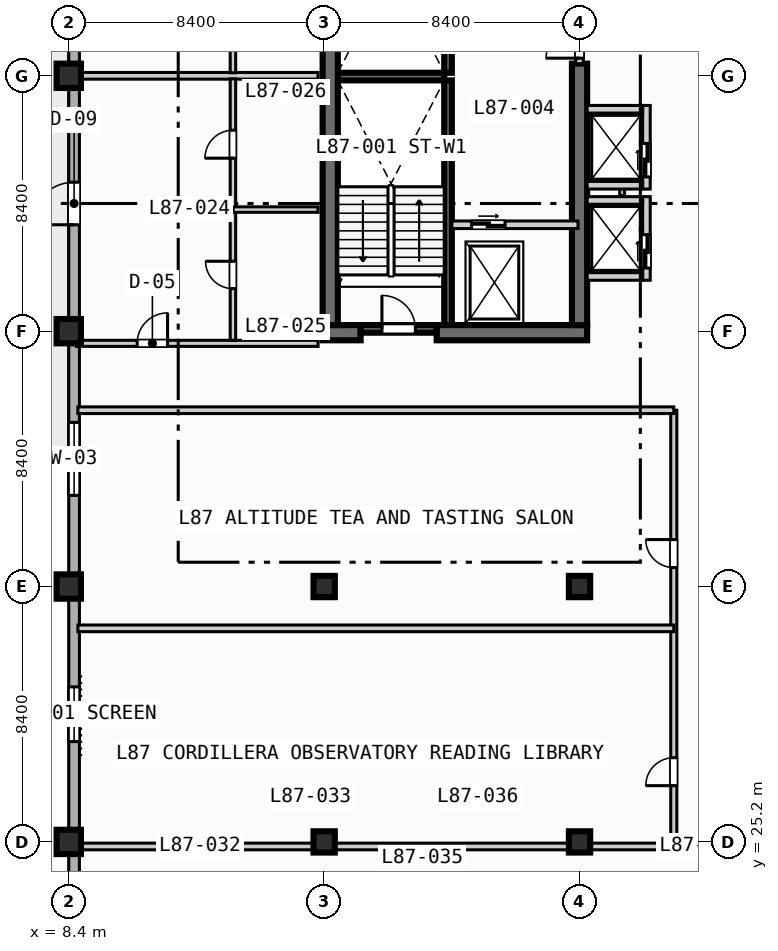
"""IFC4 building model, lengths in metres.
Left out: names, types, materials, properties, quantities, classifications, styles, units other than length and angle.
Written with IfcOpenShell. Run it as: python <this file> out.ifc"""

import sys

from ifc_helpers import new_model, si_unit, direction, frame, frame_2d, origin, origin_2d, place, context, subcontext, project, spatial, rectangle, extrude, element, fill, save


model = new_model("IFC4")
c1 = context("Model", 3, precision=1e-05, world=origin(), true_north=direction((0.0, 1.0)))
c2 = subcontext(c1, "Body", "Model", "MODEL_VIEW")
j1 = project(units=[si_unit("LENGTHUNIT", "METRE"), si_unit("PLANEANGLEUNIT", "RADIAN")], contexts=[c1])
p1 = place(None, origin())
s1 = spatial("IfcSite", under=j1, at=p1, CompositionType="ELEMENT")
p2 = place(p1, origin())
s2 = spatial("IfcBuilding", under=s1, at=p2, CompositionType="ELEMENT")
p3 = place(p2, frame((0.0, 0.0, 351.5)))
s3 = spatial("IfcBuildingStorey", under=s2, at=p3, CompositionType="ELEMENT", Elevation=351.5)
for number, where, z_axis, x_axis in (
    (1, (20.875, 42.2, 0.0), (0.0, 0.0, 1.0), (0.0, 1.0, 0.0)),
    (2, (20.875, 50.5, 0.0), (0.0, 0.0, 1.0), (0.0, 1.0, 0.0)),
):
    element("IfcWall", number, at=place(p3, frame(where, z_axis=z_axis, x_axis=x_axis)), inside=s3, PredefinedType="SOLIDWALL", context=c2, shape_type="SweptSolid", body=[
        extrude(rectangle(XDim=8.05, YDim=0.25, at=frame_2d((4.025, 0.0))), origin(), (0.0, 0.0, 1.0), 3.67),
    ])
p4 = place(p3, frame((17.25, 50.375, 0.0), z_axis=(0.0, 0.0, 1.0), x_axis=(1.0, 0.0, 0.0)))
e3 = element("IfcWall", 3, at=p4, inside=s3, PredefinedType="SOLIDWALL", context=c2, shape_type="SweptSolid", body=[
    extrude(rectangle(XDim=3.5, YDim=0.25, at=frame_2d((1.75, 0.0))), origin(), (0.0, 0.0, 1.0), 3.67),
])
p5 = place(p3, frame((16.75, 41.95, 0.0), z_axis=(0.0, 0.0, 1.0), x_axis=(1.0, 0.0, 0.0)))
e4 = element("IfcWall", 4, at=p5, inside=s3, PredefinedType="SHEAR", context=c2, shape_type="SweptSolid", body=[
    extrude(rectangle(XDim=1.25, YDim=0.5, at=frame_2d((0.625, 0.0))), origin(), (0.0, 0.0, 1.0), 3.67),
])
p6 = place(p3, frame((20.5, 41.95, 0.0), z_axis=(0.0, 0.0, 1.0), x_axis=(1.0, 0.0, 0.0)))
e5 = element("IfcWall", 5, at=p6, inside=s3, PredefinedType="SHEAR", context=c2, shape_type="SweptSolid", body=[
    extrude(rectangle(XDim=4.95, YDim=0.5, at=frame_2d((2.475, 0.0))), origin(), (0.0, 0.0, 1.0), 3.67),
])
p7 = place(p3, frame((17.0, 42.2, 0.0), z_axis=(0.0, 0.0, 1.0), x_axis=(0.0, 1.0, 0.0)))
e6 = element("IfcWall", 6, at=p7, inside=s3, PredefinedType="SHEAR", context=c2, shape_type="SweptSolid", body=[
    extrude(rectangle(XDim=16.35, YDim=0.5, at=frame_2d((8.175, 0.0))), origin(), (0.0, 0.0, 1.0), 3.67),
])
p8 = place(p3, frame((25.2, 42.2, 0.0), z_axis=(0.0, 0.0, 1.0), x_axis=(0.0, 1.0, 0.0)))
e7 = element("IfcWall", 7, at=p8, inside=s3, PredefinedType="SHEAR", context=c2, shape_type="SweptSolid", body=[
    extrude(rectangle(XDim=8.6, YDim=0.5, at=frame_2d((4.3, 0.0))), origin(), (0.0, 0.0, 1.0), 3.67),
])
for number, where, z_axis, x_axis in (
    (8, (8.4, 25.2, 0.0), (0.0, 0.0, 1.0), (1.0, 0.0, 0.0)),
    (9, (8.4, 33.6, 0.0), (0.0, 0.0, 1.0), (1.0, 0.0, 0.0)),
    (10, (8.4, 42.0, 0.0), (0.0, 0.0, 1.0), (1.0, 0.0, 0.0)),
    (11, (8.4, 50.4, 0.0), (0.0, 0.0, 1.0), (1.0, 0.0, 0.0)),
):
    element("IfcColumn", number, at=place(p3, frame(where, z_axis=z_axis, x_axis=x_axis)), inside=s3, PredefinedType="COLUMN", context=c2, shape_type="SweptSolid", body=[
        extrude(rectangle(XDim=0.8, YDim=0.8, at=origin_2d()), origin(), (0.0, 0.0, 1.0), 3.9),
    ])
for number, where, z_axis, x_axis in (
    (12, (16.8, 25.2, 0.0), (0.0, 0.0, 1.0), (1.0, 0.0, 0.0)),
    (13, (16.8, 33.6, 0.0), (0.0, 0.0, 1.0), (1.0, 0.0, 0.0)),
    (14, (25.2, 25.2, 0.0), (0.0, 0.0, 1.0), (1.0, 0.0, 0.0)),
    (15, (25.2, 33.6, 0.0), (0.0, 0.0, 1.0), (1.0, 0.0, 0.0)),
):
    element("IfcColumn", number, at=place(p3, frame(where, z_axis=z_axis, x_axis=x_axis)), inside=s3, PredefinedType="COLUMN", context=c2, shape_type="SweptSolid", body=[
        extrude(rectangle(XDim=0.7, YDim=0.7, at=origin_2d()), origin(), (0.0, 0.0, 1.0), 3.9),
    ])
p9 = place(p3, frame((8.575, 11.575, 0.0), z_axis=(0.0, 0.0, 1.0), x_axis=(0.0, 1.0, 0.0)))
e16 = element("IfcWall", 16, at=p9, inside=s3, PredefinedType="STANDARD", context=c2, shape_type="SweptSolid", body=[
    extrude(rectangle(XDim=60.85, YDim=0.35, at=frame_2d((30.425, 0.0))), origin(), (0.0, 0.0, 1.0), 3.67),
])
p10 = place(p9, frame((33.925, 0.0, 0.0)))
e17 = element("IfcOpeningElement", 17, at=p10, cuts=e16, PredefinedType="OPENING", context=c2, shape_type="SweptSolid", body=[
    extrude(rectangle(XDim=1.4, YDim=2.2, at=frame_2d((0.7, 1.1))), frame((0.0, 0.185, 0.0), z_axis=(0.0, -1.0, 0.0), x_axis=(1.0, 0.0, 0.0)), (0.0, 0.0, 1.0), 0.37),
])
p11 = place(p9, frame((16.925, 0.0, 0.85)))
e18 = element("IfcOpeningElement", 18, at=p11, cuts=e16, PredefinedType="OPENING", context=c2, shape_type="SweptSolid", body=[
    extrude(rectangle(XDim=1.8, YDim=1.8, at=frame_2d((0.9, 0.9))), frame((0.0, 0.185, 0.0), z_axis=(0.0, -1.0, 0.0), x_axis=(1.0, 0.0, 0.0)), (0.0, 0.0, 1.0), 0.37),
])
p12 = place(p9, frame((25.025, 0.0, 0.85)))
e19 = element("IfcOpeningElement", 19, at=p12, cuts=e16, PredefinedType="OPENING", context=c2, shape_type="SweptSolid", body=[
    extrude(rectangle(XDim=2.4, YDim=1.95, at=frame_2d((1.2, 0.975))), frame((0.0, 0.185, 0.0), z_axis=(0.0, -1.0, 0.0), x_axis=(1.0, 0.0, 0.0)), (0.0, 0.0, 1.0), 0.37),
])
p13 = place(p9, frame((41.825, 0.0, 0.85)))
e20 = element("IfcOpeningElement", 20, at=p13, cuts=e16, PredefinedType="OPENING", context=c2, shape_type="SweptSolid", body=[
    extrude(rectangle(XDim=2.4, YDim=1.95, at=frame_2d((1.2, 0.975))), frame((0.0, 0.185, 0.0), z_axis=(0.0, -1.0, 0.0), x_axis=(1.0, 0.0, 0.0)), (0.0, 0.0, 1.0), 0.37),
])
p14 = place(p3, frame((18.0, 42.075, 0.0), z_axis=(0.0, 0.0, 1.0), x_axis=(1.0, 0.0, 0.0)))
e21 = element("IfcWall", 21, at=p14, inside=s3, PredefinedType="SOLIDWALL", context=c2, shape_type="SweptSolid", body=[
    extrude(rectangle(XDim=2.5, YDim=0.25, at=frame_2d((1.25, 0.0))), origin(), (0.0, 0.0, 1.0), 3.67),
])
p15 = place(p14, frame((0.7, 0.0, 0.0)))
e22 = element("IfcOpeningElement", 22, at=p15, cuts=e21, PredefinedType="OPENING", context=c2, shape_type="SweptSolid", body=[
    extrude(rectangle(XDim=1.1, YDim=2.15, at=frame_2d((0.55, 1.075))), frame((0.0, 0.135, 0.0), z_axis=(0.0, -1.0, 0.0), x_axis=(1.0, 0.0, 0.0)), (0.0, 0.0, 1.0), 0.27),
])
p16 = place(p3, frame((21.0, 45.5, 0.0), z_axis=(0.0, 0.0, 1.0), x_axis=(1.0, 0.0, 0.0)))
e23 = element("IfcWall", 23, at=p16, inside=s3, PredefinedType="SOLIDWALL", context=c2, shape_type="SweptSolid", body=[
    extrude(rectangle(XDim=4.15, YDim=0.25, at=frame_2d((2.075, 0.0))), origin(), (0.0, 0.0, 1.0), 3.67),
])
p17 = place(p16, frame((0.65, 0.0, 0.0)))
e24 = element("IfcOpeningElement", 24, at=p17, cuts=e23, PredefinedType="OPENING", context=c2, shape_type="SweptSolid", body=[
    extrude(rectangle(XDim=1.1, YDim=2.15, at=frame_2d((0.55, 1.075))), frame((0.0, 0.135, 0.0), z_axis=(0.0, -1.0, 0.0), x_axis=(1.0, 0.0, 0.0)), (0.0, 0.0, 1.0), 0.27),
])
p18 = place(p3, frame((25.2, 50.8, 0.0), z_axis=(0.0, 0.0, 1.0), x_axis=(0.0, 1.0, 0.0)))
e25 = element("IfcWall", 25, at=p18, inside=s3, PredefinedType="SOLIDWALL", context=c2, shape_type="SweptSolid", body=[
    extrude(rectangle(XDim=1.48, YDim=0.25, at=frame_2d((0.74, 0.0))), origin(), (0.0, 0.0, 1.0), 3.67),
])
p19 = place(p18, frame((0.18, 0.0, 0.0)))
e26 = element("IfcOpeningElement", 26, at=p19, cuts=e25, PredefinedType="OPENING", context=c2, shape_type="SweptSolid", body=[
    extrude(rectangle(XDim=1.1, YDim=2.15, at=frame_2d((0.55, 1.075))), frame((0.0, 0.135, 0.0), z_axis=(0.0, -1.0, 0.0), x_axis=(1.0, 0.0, 0.0)), (0.0, 0.0, 1.0), 0.27),
])
p20 = place(p3, frame((27.4, 43.675, 0.0), z_axis=(0.0, 0.0, 1.0), x_axis=(0.0, 1.0, 0.0)))
e27 = element("IfcWall", 27, at=p20, inside=s3, PredefinedType="SOLIDWALL", context=c2, shape_type="SweptSolid", body=[
    extrude(rectangle(XDim=2.75, YDim=0.25, at=frame_2d((1.375, 0.0))), origin(), (0.0, 0.0, 1.0), 3.67),
])
p21 = place(p20, frame((0.4, 0.0, 0.0)))
e28 = element("IfcOpeningElement", 28, at=p21, cuts=e27, PredefinedType="OPENING", context=c2, shape_type="SweptSolid", body=[
    extrude(rectangle(XDim=1.1, YDim=2.15, at=frame_2d((0.55, 1.075))), frame((0.0, 0.135, 0.0), z_axis=(0.0, -1.0, 0.0), x_axis=(1.0, 0.0, 0.0)), (0.0, 0.0, 1.0), 0.27),
])
for number, where, z_axis, x_axis in (
    (29, (25.45, 43.8, 0.0), (0.0, 0.0, 1.0), (1.0, 0.0, 0.0)),
    (30, (25.45, 46.3, 0.0), (0.0, 0.0, 1.0), (1.0, 0.0, 0.0)),
):
    element("IfcWall", number, at=place(p3, frame(where, z_axis=z_axis, x_axis=x_axis)), inside=s3, PredefinedType="SOLIDWALL", context=c2, shape_type="SweptSolid", body=[
        extrude(rectangle(XDim=1.825, YDim=0.25, at=frame_2d((0.913, 0.0))), origin(), (0.0, 0.0, 1.0), 3.67),
    ])
p22 = place(p3, frame((26.6, 46.46, 0.0), z_axis=(0.0, 0.0, 1.0), x_axis=(0.0, 1.0, 0.0)))
e31 = element("IfcWall", 31, at=p22, inside=s3, PredefinedType="PARTITIONING", context=c2, shape_type="SweptSolid", body=[
    extrude(rectangle(XDim=0.88, YDim=0.16, at=frame_2d((0.44, 0.0))), origin(), (0.0, 0.0, 1.0), 3.67),
])
p23 = place(p3, frame((27.4, 46.675, 0.0), z_axis=(0.0, 0.0, 1.0), x_axis=(0.0, 1.0, 0.0)))
e32 = element("IfcWall", 32, at=p23, inside=s3, PredefinedType="SOLIDWALL", context=c2, shape_type="SweptSolid", body=[
    extrude(rectangle(XDim=2.75, YDim=0.25, at=frame_2d((1.375, 0.0))), origin(), (0.0, 0.0, 1.0), 3.67),
])
p24 = place(p23, frame((0.4, 0.0, 0.0)))
e33 = element("IfcOpeningElement", 33, at=p24, cuts=e32, PredefinedType="OPENING", context=c2, shape_type="SweptSolid", body=[
    extrude(rectangle(XDim=1.1, YDim=2.15, at=frame_2d((0.55, 1.075))), frame((0.0, 0.135, 0.0), z_axis=(0.0, -1.0, 0.0), x_axis=(1.0, 0.0, 0.0)), (0.0, 0.0, 1.0), 0.27),
])
for number, where, z_axis, x_axis in (
    (34, (25.45, 46.8, 0.0), (0.0, 0.0, 1.0), (1.0, 0.0, 0.0)),
    (35, (25.45, 49.3, 0.0), (0.0, 0.0, 1.0), (1.0, 0.0, 0.0)),
):
    element("IfcWall", number, at=place(p3, frame(where, z_axis=z_axis, x_axis=x_axis)), inside=s3, PredefinedType="SOLIDWALL", context=c2, shape_type="SweptSolid", body=[
        extrude(rectangle(XDim=1.825, YDim=0.25, at=frame_2d((0.913, 0.0))), origin(), (0.0, 0.0, 1.0), 3.67),
    ])
p25 = place(p3, frame((8.65, 41.6, 0.0), z_axis=(0.0, 0.0, 1.0), x_axis=(1.0, 0.0, 0.0)))
e36 = element("IfcWall", 36, at=p25, inside=s3, PredefinedType="PARTITIONING", context=c2, shape_type="SweptSolid", body=[
    extrude(rectangle(XDim=7.95, YDim=0.2, at=frame_2d((3.975, 0.0))), origin(), (0.0, 0.0, 1.0), 3.67),
])
p26 = place(p25, frame((2.0, 0.0, 0.0)))
e37 = element("IfcOpeningElement", 37, at=p26, cuts=e36, PredefinedType="OPENING", context=c2, shape_type="SweptSolid", body=[
    extrude(rectangle(XDim=1.0, YDim=2.15, at=frame_2d((0.5, 1.075))), frame((0.0, 0.11, 0.0), z_axis=(0.0, -1.0, 0.0), x_axis=(1.0, 0.0, 0.0)), (0.0, 0.0, 1.0), 0.22),
])
p27 = place(p3, frame((8.65, 50.4, 0.0), z_axis=(0.0, 0.0, 1.0), x_axis=(1.0, 0.0, 0.0)))
e38 = element("IfcWall", 38, at=p27, inside=s3, PredefinedType="PARTITIONING", context=c2, shape_type="SweptSolid", body=[
    extrude(rectangle(XDim=7.95, YDim=0.22, at=frame_2d((3.975, 0.0))), origin(), (0.0, 0.0, 1.0), 3.07),
])
p28 = place(p3, frame((13.8, 41.7, 0.0), z_axis=(0.0, 0.0, 1.0), x_axis=(0.0, 1.0, 0.0)))
e39 = element("IfcWall", 39, at=p28, inside=s3, PredefinedType="PLUMBINGWALL", context=c2, shape_type="SweptSolid", body=[
    extrude(rectangle(XDim=8.6, YDim=0.18, at=frame_2d((4.3, 0.0))), origin(), (0.0, 0.0, 1.0), 3.67),
])
p29 = place(p28, frame((1.7, 0.0, 0.0)))
e40 = element("IfcOpeningElement", 40, at=p29, cuts=e39, PredefinedType="OPENING", context=c2, shape_type="SweptSolid", body=[
    extrude(rectangle(XDim=0.9, YDim=2.1, at=frame_2d((0.45, 1.05))), frame((0.0, 0.1, 0.0), z_axis=(0.0, -1.0, 0.0), x_axis=(1.0, 0.0, 0.0)), (0.0, 0.0, 1.0), 0.2),
])
p30 = place(p28, frame((5.99, 0.0, 0.0)))
e41 = element("IfcOpeningElement", 41, at=p30, cuts=e39, PredefinedType="OPENING", context=c2, shape_type="SweptSolid", body=[
    extrude(rectangle(XDim=0.92, YDim=2.1, at=frame_2d((0.46, 1.05))), frame((0.0, 0.1, 0.0), z_axis=(0.0, -1.0, 0.0), x_axis=(1.0, 0.0, 0.0)), (0.0, 0.0, 1.0), 0.2),
])
p31 = place(p3, frame((13.8, 46.0, 0.0), z_axis=(0.0, 0.0, 1.0), x_axis=(1.0, 0.0, 0.0)))
e42 = element("IfcWall", 42, at=p31, inside=s3, PredefinedType="PLUMBINGWALL", context=c2, shape_type="SweptSolid", body=[
    extrude(rectangle(XDim=2.8, YDim=0.18, at=frame_2d((1.4, 0.0))), origin(), (0.0, 0.0, 1.0), 3.67),
])
p32 = place(p3, frame((13.8, 50.5, 0.0), z_axis=(0.0, 0.0, 1.0), x_axis=(0.0, 1.0, 0.0)))
e43 = element("IfcWall", 43, at=p32, inside=s3, PredefinedType="PLUMBINGWALL", context=c2, shape_type="SweptSolid", body=[
    extrude(rectangle(XDim=8.4, YDim=0.18, at=frame_2d((4.2, 0.0))), origin(), (0.0, 0.0, 1.0), 3.67),
])
p33 = place(p32, frame((1.65, 0.0, 0.0)))
e44 = element("IfcOpeningElement", 44, at=p33, cuts=e43, PredefinedType="OPENING", context=c2, shape_type="SweptSolid", body=[
    extrude(rectangle(XDim=0.9, YDim=2.1, at=frame_2d((0.45, 1.05))), frame((0.0, 0.1, 0.0), z_axis=(0.0, -1.0, 0.0), x_axis=(1.0, 0.0, 0.0)), (0.0, 0.0, 1.0), 0.2),
])
p34 = place(p32, frame((5.84, 0.0, 0.0)))
e45 = element("IfcOpeningElement", 45, at=p34, cuts=e43, PredefinedType="OPENING", context=c2, shape_type="SweptSolid", body=[
    extrude(rectangle(XDim=0.92, YDim=2.1, at=frame_2d((0.46, 1.05))), frame((0.0, 0.1, 0.0), z_axis=(0.0, -1.0, 0.0), x_axis=(1.0, 0.0, 0.0)), (0.0, 0.0, 1.0), 0.2),
])
p35 = place(p3, frame((28.3, 25.05, 0.0), z_axis=(0.0, 0.0, 1.0), x_axis=(0.0, 1.0, 0.0)))
e46 = element("IfcWall", 46, at=p35, inside=s3, PredefinedType="PARTITIONING", context=c2, shape_type="SweptSolid", body=[
    extrude(rectangle(XDim=14.35, YDim=0.2, at=frame_2d((7.175, 0.0))), origin(), (0.0, 0.0, 1.0), 3.67),
])
p36 = place(p35, frame((2.0, 0.0, 0.0)))
e47 = element("IfcOpeningElement", 47, at=p36, cuts=e46, PredefinedType="OPENING", context=c2, shape_type="SweptSolid", body=[
    extrude(rectangle(XDim=0.92, YDim=2.1, at=frame_2d((0.46, 1.05))), frame((0.0, 0.11, 0.0), z_axis=(0.0, -1.0, 0.0), x_axis=(1.0, 0.0, 0.0)), (0.0, 0.0, 1.0), 0.22),
])
p37 = place(p35, frame((9.175, 0.0, 0.0)))
e48 = element("IfcOpeningElement", 48, at=p37, cuts=e46, PredefinedType="OPENING", context=c2, shape_type="SweptSolid", body=[
    extrude(rectangle(XDim=0.92, YDim=2.1, at=frame_2d((0.46, 1.05))), frame((0.0, 0.11, 0.0), z_axis=(0.0, -1.0, 0.0), x_axis=(1.0, 0.0, 0.0)), (0.0, 0.0, 1.0), 0.22),
])
p38 = place(p3, frame((8.7, 25.05, 0.0), z_axis=(0.0, 0.0, 1.0), x_axis=(1.0, 0.0, 0.0)))
e49 = element("IfcWall", 49, at=p38, inside=s3, PredefinedType="PARTITIONING", context=c2, shape_type="SweptSolid", body=[
    extrude(rectangle(XDim=19.6, YDim=0.22, at=frame_2d((9.8, 0.0))), origin(), (0.0, 0.0, 1.0), 3.07),
])
for number, where, z_axis, x_axis in (
    (50, (8.7, 32.225, 0.0), (0.0, 0.0, 1.0), (1.0, 0.0, 0.0)),
    (51, (8.7, 39.4, 0.0), (0.0, 0.0, 1.0), (1.0, 0.0, 0.0)),
):
    element("IfcWall", number, at=place(p3, frame(where, z_axis=z_axis, x_axis=x_axis)), inside=s3, PredefinedType="PARTITIONING", context=c2, shape_type="SweptSolid", body=[
        extrude(rectangle(XDim=19.6, YDim=0.22, at=frame_2d((9.8, 0.0))), origin(), (0.0, 0.0, 1.0), 3.67),
    ])
p39 = place(p10, origin())
e52 = element("IfcDoor", 52, at=p39, inside=s3, OperationType="SINGLE_SWING_LEFT", PredefinedType="DOOR", context=c2, shape_type="SweptSolid", body=[
    extrude(rectangle(XDim=1.4, YDim=2.2, at=frame_2d((0.7, 1.1))), frame((0.0, 0.025, 0.0), z_axis=(0.0, -1.0, 0.0), x_axis=(1.0, 0.0, 0.0)), (0.0, 0.0, 1.0), 0.05),
])
fill(e17, e52)
p40 = place(p11, origin())
e53 = element("IfcWindow", 53, at=p40, inside=s3, PartitioningType="SINGLE_PANEL", PredefinedType="WINDOW", context=c2, shape_type="SweptSolid", body=[
    extrude(rectangle(XDim=1.8, YDim=1.8, at=frame_2d((0.9, 0.9))), frame((0.0, 0.03, 0.0), z_axis=(0.0, -1.0, 0.0), x_axis=(1.0, 0.0, 0.0)), (0.0, 0.0, 1.0), 0.06),
])
fill(e18, e53)
p41 = place(p12, origin())
e54 = element("IfcWindow", 54, at=p41, inside=s3, PartitioningType="SINGLE_PANEL", PredefinedType="WINDOW", context=c2, shape_type="SweptSolid", body=[
    extrude(rectangle(XDim=2.4, YDim=1.95, at=frame_2d((1.2, 0.975))), frame((0.0, 0.03, 0.0), z_axis=(0.0, -1.0, 0.0), x_axis=(1.0, 0.0, 0.0)), (0.0, 0.0, 1.0), 0.06),
])
fill(e19, e54)
p42 = place(p15, origin())
e55 = element("IfcDoor", 55, at=p42, inside=s3, OperationType="SINGLE_SWING_LEFT", PredefinedType="DOOR", context=c2, shape_type="SweptSolid", body=[
    extrude(rectangle(XDim=1.1, YDim=2.15, at=frame_2d((0.55, 1.075))), frame((0.0, 0.025, 0.0), z_axis=(0.0, -1.0, 0.0), x_axis=(1.0, 0.0, 0.0)), (0.0, 0.0, 1.0), 0.05),
])
fill(e22, e55)
p43 = place(p17, origin())
e56 = element("IfcDoor", 56, at=p43, inside=s3, OperationType="SLIDING_TO_LEFT", PredefinedType="DOOR", context=c2, shape_type="SweptSolid", body=[
    extrude(rectangle(XDim=1.1, YDim=2.15, at=frame_2d((0.55, 1.075))), frame((0.0, 0.025, 0.0), z_axis=(0.0, -1.0, 0.0), x_axis=(1.0, 0.0, 0.0)), (0.0, 0.0, 1.0), 0.05),
])
fill(e24, e56)
p44 = place(p19, origin())
e57 = element("IfcDoor", 57, at=p44, inside=s3, OperationType="SINGLE_SWING_LEFT", PredefinedType="DOOR", context=c2, shape_type="SweptSolid", body=[
    extrude(rectangle(XDim=1.1, YDim=2.15, at=frame_2d((0.55, 1.075))), frame((0.0, 0.025, 0.0), z_axis=(0.0, -1.0, 0.0), x_axis=(1.0, 0.0, 0.0)), (0.0, 0.0, 1.0), 0.05),
])
fill(e26, e57)
p45 = place(p21, origin())
e58 = element("IfcDoor", 58, at=p45, inside=s3, OperationType="SLIDING_TO_LEFT", PredefinedType="DOOR", context=c2, shape_type="SweptSolid", body=[
    extrude(rectangle(XDim=1.1, YDim=2.15, at=frame_2d((0.55, 1.075))), frame((0.0, 0.025, 0.0), z_axis=(0.0, -1.0, 0.0), x_axis=(1.0, 0.0, 0.0)), (0.0, 0.0, 1.0), 0.05),
])
fill(e28, e58)
p46 = place(p24, origin())
e59 = element("IfcDoor", 59, at=p46, inside=s3, OperationType="SLIDING_TO_LEFT", PredefinedType="DOOR", context=c2, shape_type="SweptSolid", body=[
    extrude(rectangle(XDim=1.1, YDim=2.15, at=frame_2d((0.55, 1.075))), frame((0.0, 0.025, 0.0), z_axis=(0.0, -1.0, 0.0), x_axis=(1.0, 0.0, 0.0)), (0.0, 0.0, 1.0), 0.05),
])
fill(e33, e59)
p47 = place(p26, origin())
e60 = element("IfcDoor", 60, at=p47, inside=s3, OperationType="SINGLE_SWING_RIGHT", PredefinedType="DOOR", context=c2, shape_type="SweptSolid", body=[
    extrude(rectangle(XDim=1.0, YDim=2.15, at=frame_2d((0.5, 1.075))), frame((0.0, 0.025, 0.0), z_axis=(0.0, -1.0, 0.0), x_axis=(1.0, 0.0, 0.0)), (0.0, 0.0, 1.0), 0.05),
])
fill(e37, e60)
p48 = place(p29, origin())
e61 = element("IfcDoor", 61, at=p48, inside=s3, OperationType="SINGLE_SWING_RIGHT", PredefinedType="DOOR", context=c2, shape_type="SweptSolid", body=[
    extrude(rectangle(XDim=0.9, YDim=2.1, at=frame_2d((0.45, 1.05))), frame((0.0, 0.025, 0.0), z_axis=(0.0, -1.0, 0.0), x_axis=(1.0, 0.0, 0.0)), (0.0, 0.0, 1.0), 0.05),
])
fill(e40, e61)
p49 = place(p30, origin())
e62 = element("IfcDoor", 62, at=p49, inside=s3, OperationType="SINGLE_SWING_LEFT", PredefinedType="DOOR", context=c2, shape_type="SweptSolid", body=[
    extrude(rectangle(XDim=0.92, YDim=2.1, at=frame_2d((0.46, 1.05))), frame((0.0, 0.025, 0.0), z_axis=(0.0, -1.0, 0.0), x_axis=(1.0, 0.0, 0.0)), (0.0, 0.0, 1.0), 0.05),
])
fill(e41, e62)
p50 = place(p36, origin())
e63 = element("IfcDoor", 63, at=p50, inside=s3, OperationType="SINGLE_SWING_LEFT", PredefinedType="DOOR", context=c2, shape_type="SweptSolid", body=[
    extrude(rectangle(XDim=0.92, YDim=2.1, at=frame_2d((0.46, 1.05))), frame((0.0, 0.025, 0.0), z_axis=(0.0, -1.0, 0.0), x_axis=(1.0, 0.0, 0.0)), (0.0, 0.0, 1.0), 0.05),
])
fill(e47, e63)
p51 = place(p37, origin())
e64 = element("IfcDoor", 64, at=p51, inside=s3, OperationType="SINGLE_SWING_RIGHT", PredefinedType="DOOR", context=c2, shape_type="SweptSolid", body=[
    extrude(rectangle(XDim=0.92, YDim=2.1, at=frame_2d((0.46, 1.05))), frame((0.0, 0.025, 0.0), z_axis=(0.0, -1.0, 0.0), x_axis=(1.0, 0.0, 0.0)), (0.0, 0.0, 1.0), 0.05),
])
fill(e48, e64)
save(model, sys.argv[1])
